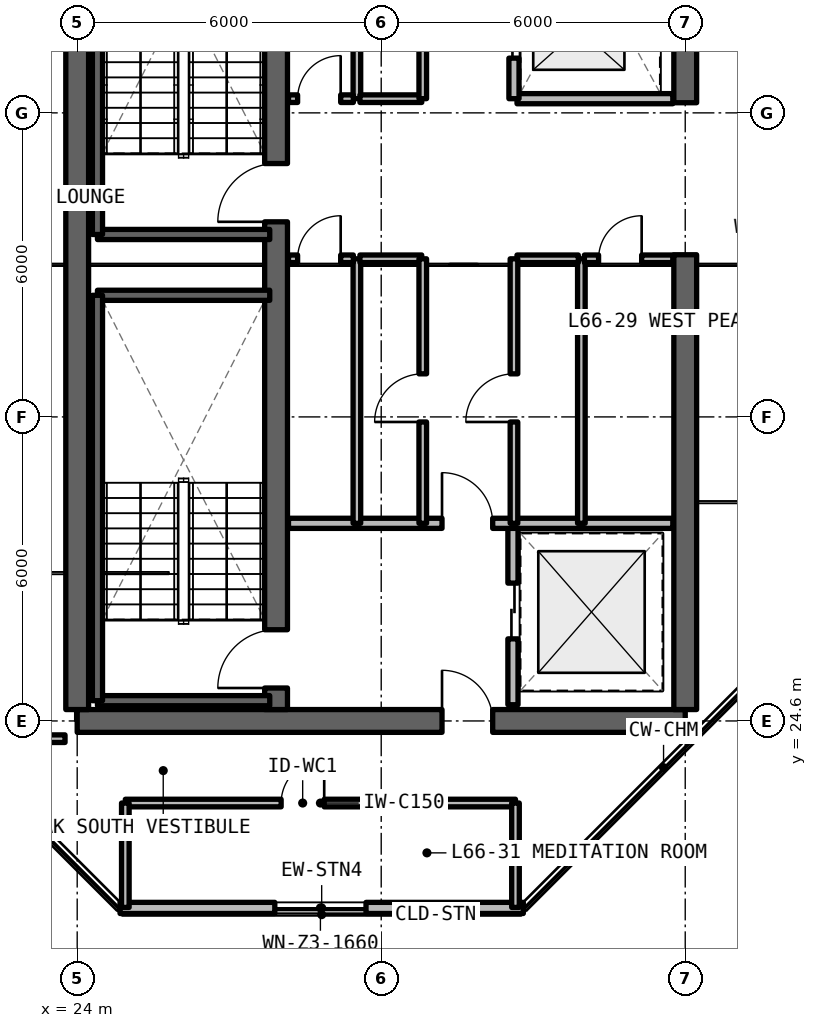
"""IFC4 building model, lengths in metres.
Left out: names, types, materials, properties, quantities, classifications, styles, units other than length and angle.
Written with IfcOpenShell. Run it as: python <this file> out.ifc"""

import sys

from ifc_helpers import new_model, si_unit, direction, frame, frame_2d, origin, place, context, subcontext, project, spatial, rectangle, extrude, element, fill, save


model = new_model("IFC4")
c1 = context("Model", 3, precision=1e-05, world=origin(), true_north=direction((0.0, 1.0)))
c2 = subcontext(c1, "Body", "Model", "MODEL_VIEW")
j1 = project(units=[si_unit("LENGTHUNIT", "METRE"), si_unit("PLANEANGLEUNIT", "RADIAN")], contexts=[c1])
p1 = place(None, origin())
s1 = spatial("IfcSite", under=j1, at=p1, CompositionType="ELEMENT")
p2 = place(p1, origin())
s2 = spatial("IfcBuilding", under=s1, at=p2, CompositionType="ELEMENT")
p3 = place(p2, frame((0.0, 0.0, 235.95)))
s3 = spatial("IfcBuildingStorey", under=s2, at=p3, CompositionType="ELEMENT", Elevation=235.95)
p4 = place(p3, frame((24.0, 24.6, 0.0), z_axis=(0.0, 0.0, 1.0), x_axis=(1.0, 0.0, 0.0)))
e1 = element("IfcWall", 1, at=p4, inside=s3, PredefinedType="SHEAR", context=c2, shape_type="SweptSolid", body=[
    extrude(rectangle(XDim=12.0, YDim=0.45, at=frame_2d((6.0, 0.0))), origin(), (0.0, 0.0, 1.0), 3.3),
])
p5 = place(p4, frame((7.2, 0.0, 0.0)))
e2 = element("IfcOpeningElement", 2, at=p5, cuts=e1, PredefinedType="OPENING", context=c2, shape_type="SweptSolid", body=[
    extrude(rectangle(XDim=1.0, YDim=2.15, at=frame_2d((0.5, 1.075))), frame((0.0, 0.235, 0.0), z_axis=(0.0, -1.0, 0.0), x_axis=(1.0, 0.0, 0.0)), (0.0, 0.0, 1.0), 0.47),
])
p6 = place(p3, frame((24.0, 24.825, 0.0), z_axis=(0.0, 0.0, 1.0), x_axis=(0.0, 1.0, 0.0)))
e3 = element("IfcWall", 3, at=p6, inside=s3, PredefinedType="SHEAR", context=c2, shape_type="SweptSolid", body=[
    extrude(rectangle(XDim=17.55, YDim=0.45, at=frame_2d((8.775, 0.0))), origin(), (0.0, 0.0, 1.0), 3.3),
])
p7 = place(p3, frame((36.0, 24.825, 0.0), z_axis=(0.0, 0.0, 1.0), x_axis=(0.0, 1.0, 0.0)))
e4 = element("IfcWall", 4, at=p7, inside=s3, PredefinedType="SHEAR", context=c2, shape_type="SweptSolid", body=[
    extrude(rectangle(XDim=8.975, YDim=0.45, at=frame_2d((4.488, 0.0))), origin(), (0.0, 0.0, 1.0), 3.3),
])
p8 = place(p3, frame((36.0, 36.8, 0.0), z_axis=(0.0, 0.0, 1.0), x_axis=(0.0, 1.0, 0.0)))
e5 = element("IfcWall", 5, at=p8, inside=s3, PredefinedType="SHEAR", context=c2, shape_type="SweptSolid", body=[
    extrude(rectangle(XDim=5.575, YDim=0.45, at=frame_2d((2.788, 0.0))), origin(), (0.0, 0.0, 1.0), 3.3),
])
p9 = place(p3, frame((27.925, 24.825, 0.0), z_axis=(0.0, 0.0, 1.0), x_axis=(0.0, 1.0, 0.0)))
e6 = element("IfcWall", 6, at=p9, inside=s3, PredefinedType="SHEAR", context=c2, shape_type="SweptSolid", body=[
    extrude(rectangle(XDim=17.55, YDim=0.45, at=frame_2d((8.775, 0.0))), origin(), (0.0, 0.0, 1.0), 3.3),
])
p10 = place(p9, frame((0.425, 0.0, 0.0)))
e7 = element("IfcOpeningElement", 7, at=p10, cuts=e6, PredefinedType="OPENING", context=c2, shape_type="SweptSolid", body=[
    extrude(rectangle(XDim=1.15, YDim=2.15, at=frame_2d((0.575, 1.075))), frame((0.0, 0.235, 0.0), z_axis=(0.0, -1.0, 0.0), x_axis=(1.0, 0.0, 0.0)), (0.0, 0.0, 1.0), 0.47),
])
p11 = place(p9, frame((9.625, 0.0, 0.0)))
e8 = element("IfcOpeningElement", 8, at=p11, cuts=e6, PredefinedType="OPENING", context=c2, shape_type="SweptSolid", body=[
    extrude(rectangle(XDim=1.15, YDim=2.15, at=frame_2d((0.575, 1.075))), frame((0.0, 0.235, 0.0), z_axis=(0.0, -1.0, 0.0), x_axis=(1.0, 0.0, 0.0)), (0.0, 0.0, 1.0), 0.47),
])
p12 = place(p3, frame((24.846, 20.91, 0.0), z_axis=(0.0, 0.0, 1.0), x_axis=(1.0, 0.0, 0.0)))
e9 = element("IfcWall", 9, at=p12, inside=s3, PredefinedType="SOLIDWALL", context=c2, shape_type="SweptSolid", body=[
    extrude(rectangle(XDim=7.959, YDim=0.22, at=frame_2d((3.979, 0.0))), origin(), (0.0, 0.0, 1.0), 3.08),
])
p13 = place(p12, frame((3.054, 0.0, 0.78)))
e10 = element("IfcOpeningElement", 10, at=p13, cuts=e9, PredefinedType="OPENING", context=c2, shape_type="SweptSolid", body=[
    extrude(rectangle(XDim=1.8, YDim=1.66, at=frame_2d((0.9, 0.83))), frame((0.0, 0.12, 0.0), z_axis=(0.0, -1.0, 0.0), x_axis=(1.0, 0.0, 0.0)), (0.0, 0.0, 1.0), 0.24),
])
p14 = place(p3, frame((32.6, 24.92, 0.0), z_axis=(0.0, 0.0, 1.0), x_axis=(0.0, 1.0, 0.0)))
e11 = element("IfcWall", 11, at=p14, inside=s3, PredefinedType="SOLIDWALL", context=c2, shape_type="SweptSolid", body=[
    extrude(rectangle(XDim=3.58, YDim=0.2, at=frame_2d((1.79, 0.0))), origin(), (0.0, 0.0, 1.0), 2.35),
])
p15 = place(p14, frame((1.3, 0.0, 0.0)))
e12 = element("IfcOpeningElement", 12, at=p15, cuts=e11, PredefinedType="OPENING", context=c2, shape_type="SweptSolid", body=[
    extrude(rectangle(XDim=1.1, YDim=2.2, at=frame_2d((0.55, 1.1))), frame((0.0, 0.11, 0.0), z_axis=(0.0, -1.0, 0.0), x_axis=(1.0, 0.0, 0.0)), (0.0, 0.0, 1.0), 0.22),
])
p16 = place(p3, frame((28.17, 28.5, 0.0), z_axis=(0.0, 0.0, 1.0), x_axis=(1.0, 0.0, 0.0)))
e13 = element("IfcWall", 13, at=p16, inside=s3, PredefinedType="SOLIDWALL", context=c2, shape_type="SweptSolid", body=[
    extrude(rectangle(XDim=7.585, YDim=0.2, at=frame_2d((3.792, 0.0))), origin(), (0.0, 0.0, 1.0), 2.35),
])
p17 = place(p16, frame((3.03, 0.0, 0.0)))
e14 = element("IfcOpeningElement", 14, at=p17, cuts=e13, PredefinedType="OPENING", context=c2, shape_type="SweptSolid", body=[
    extrude(rectangle(XDim=1.0, YDim=2.15, at=frame_2d((0.5, 1.075))), frame((0.0, 0.11, 0.0), z_axis=(0.0, -1.0, 0.0), x_axis=(1.0, 0.0, 0.0)), (0.0, 0.0, 1.0), 0.22),
])
p18 = place(p3, frame((29.52, 28.5, 0.0), z_axis=(0.0, 0.0, 1.0), x_axis=(0.0, 1.0, 0.0)))
e15 = element("IfcWall", 15, at=p18, inside=s3, PredefinedType="SOLIDWALL", context=c2, shape_type="SweptSolid", body=[
    extrude(rectangle(XDim=5.22, YDim=0.15, at=frame_2d((2.61, 0.0))), origin(), (0.0, 0.0, 1.0), 2.35),
])
p19 = place(p3, frame((28.17, 33.72, 0.0), z_axis=(0.0, 0.0, 1.0), x_axis=(1.0, 0.0, 0.0)))
e16 = element("IfcWall", 16, at=p19, inside=s3, PredefinedType="SOLIDWALL", context=c2, shape_type="SweptSolid", body=[
    extrude(rectangle(XDim=1.28, YDim=0.15, at=frame_2d((0.64, 0.0))), origin(), (0.0, 0.0, 1.0), 2.35),
])
p20 = place(p19, frame((0.18, 0.0, 0.0)))
e17 = element("IfcOpeningElement", 17, at=p20, cuts=e16, PredefinedType="OPENING", context=c2, shape_type="SweptSolid", body=[
    extrude(rectangle(XDim=0.85, YDim=2.1, at=frame_2d((0.425, 1.05))), frame((0.0, 0.085, 0.0), z_axis=(0.0, -1.0, 0.0), x_axis=(1.0, 0.0, 0.0)), (0.0, 0.0, 1.0), 0.17),
])
p21 = place(p3, frame((29.58, 33.72, 0.0), z_axis=(0.0, 0.0, 1.0), x_axis=(1.0, 0.0, 0.0)))
e18 = element("IfcWall", 18, at=p21, inside=s3, PredefinedType="SOLIDWALL", context=c2, shape_type="SweptSolid", body=[
    extrude(rectangle(XDim=1.22, YDim=0.15, at=frame_2d((0.61, 0.0))), origin(), (0.0, 0.0, 1.0), 2.35),
])
p22 = place(p3, frame((30.82, 28.5, 0.0), z_axis=(0.0, 0.0, 1.0), x_axis=(0.0, 1.0, 0.0)))
e19 = element("IfcWall", 19, at=p22, inside=s3, PredefinedType="SOLIDWALL", context=c2, shape_type="SweptSolid", body=[
    extrude(rectangle(XDim=5.22, YDim=0.15, at=frame_2d((2.61, 0.0))), origin(), (0.0, 0.0, 1.0), 2.35),
])
p23 = place(p22, frame((2.0, 0.0, 0.0)))
e20 = element("IfcOpeningElement", 20, at=p23, cuts=e19, PredefinedType="OPENING", context=c2, shape_type="SweptSolid", body=[
    extrude(rectangle(XDim=0.95, YDim=2.15, at=frame_2d((0.475, 1.075))), frame((0.0, 0.085, 0.0), z_axis=(0.0, -1.0, 0.0), x_axis=(1.0, 0.0, 0.0)), (0.0, 0.0, 1.0), 0.17),
])
p24 = place(p3, frame((33.95, 28.5, 0.0), z_axis=(0.0, 0.0, 1.0), x_axis=(0.0, 1.0, 0.0)))
e21 = element("IfcWall", 21, at=p24, inside=s3, PredefinedType="SOLIDWALL", context=c2, shape_type="SweptSolid", body=[
    extrude(rectangle(XDim=5.22, YDim=0.15, at=frame_2d((2.61, 0.0))), origin(), (0.0, 0.0, 1.0), 2.35),
])
p25 = place(p3, frame((32.68, 33.72, 0.0), z_axis=(0.0, 0.0, 1.0), x_axis=(1.0, 0.0, 0.0)))
e22 = element("IfcWall", 22, at=p25, inside=s3, PredefinedType="SOLIDWALL", context=c2, shape_type="SweptSolid", body=[
    extrude(rectangle(XDim=1.21, YDim=0.15, at=frame_2d((0.605, 0.0))), origin(), (0.0, 0.0, 1.0), 2.35),
])
p26 = place(p3, frame((34.01, 33.72, 0.0), z_axis=(0.0, 0.0, 1.0), x_axis=(1.0, 0.0, 0.0)))
e23 = element("IfcWall", 23, at=p26, inside=s3, PredefinedType="SOLIDWALL", context=c2, shape_type="SweptSolid", body=[
    extrude(rectangle(XDim=1.745, YDim=0.15, at=frame_2d((0.873, 0.0))), origin(), (0.0, 0.0, 1.0), 2.35),
])
p27 = place(p26, frame((0.28, 0.0, 0.0)))
e24 = element("IfcOpeningElement", 24, at=p27, cuts=e23, PredefinedType="OPENING", context=c2, shape_type="SweptSolid", body=[
    extrude(rectangle(XDim=0.85, YDim=2.1, at=frame_2d((0.425, 1.05))), frame((0.0, 0.085, 0.0), z_axis=(0.0, -1.0, 0.0), x_axis=(1.0, 0.0, 0.0)), (0.0, 0.0, 1.0), 0.17),
])
p28 = place(p3, frame((32.62, 28.5, 0.0), z_axis=(0.0, 0.0, 1.0), x_axis=(0.0, 1.0, 0.0)))
e25 = element("IfcWall", 25, at=p28, inside=s3, PredefinedType="SOLIDWALL", context=c2, shape_type="SweptSolid", body=[
    extrude(rectangle(XDim=5.22, YDim=0.15, at=frame_2d((2.61, 0.0))), origin(), (0.0, 0.0, 1.0), 2.35),
])
p29 = place(p28, frame((2.0, 0.0, 0.0)))
e26 = element("IfcOpeningElement", 26, at=p29, cuts=e25, PredefinedType="OPENING", context=c2, shape_type="SweptSolid", body=[
    extrude(rectangle(XDim=0.95, YDim=2.15, at=frame_2d((0.475, 1.075))), frame((0.0, 0.085, 0.0), z_axis=(0.0, -1.0, 0.0), x_axis=(1.0, 0.0, 0.0)), (0.0, 0.0, 1.0), 0.17),
])
p30 = place(p3, frame((29.52, 36.88, 0.0), z_axis=(0.0, 0.0, 1.0), x_axis=(0.0, 1.0, 0.0)))
e27 = element("IfcWall", 27, at=p30, inside=s3, PredefinedType="SOLIDWALL", context=c2, shape_type="SweptSolid", body=[
    extrude(rectangle(XDim=5.42, YDim=0.15, at=frame_2d((2.71, 0.0))), origin(), (0.0, 0.0, 1.0), 2.35),
])
p31 = place(p3, frame((28.17, 36.88, 0.0), z_axis=(0.0, 0.0, 1.0), x_axis=(1.0, 0.0, 0.0)))
e28 = element("IfcWall", 28, at=p31, inside=s3, PredefinedType="SOLIDWALL", context=c2, shape_type="SweptSolid", body=[
    extrude(rectangle(XDim=1.28, YDim=0.15, at=frame_2d((0.64, 0.0))), origin(), (0.0, 0.0, 1.0), 2.35),
])
p32 = place(p31, frame((0.18, 0.0, 0.0)))
e29 = element("IfcOpeningElement", 29, at=p32, cuts=e28, PredefinedType="OPENING", context=c2, shape_type="SweptSolid", body=[
    extrude(rectangle(XDim=0.85, YDim=2.1, at=frame_2d((0.425, 1.05))), frame((0.0, 0.085, 0.0), z_axis=(0.0, -1.0, 0.0), x_axis=(1.0, 0.0, 0.0)), (0.0, 0.0, 1.0), 0.17),
])
p33 = place(p3, frame((29.58, 36.88, 0.0), z_axis=(0.0, 0.0, 1.0), x_axis=(1.0, 0.0, 0.0)))
e30 = element("IfcWall", 30, at=p33, inside=s3, PredefinedType="SOLIDWALL", context=c2, shape_type="SweptSolid", body=[
    extrude(rectangle(XDim=1.22, YDim=0.15, at=frame_2d((0.61, 0.0))), origin(), (0.0, 0.0, 1.0), 2.35),
])
p34 = place(p3, frame((30.82, 36.88, 0.0), z_axis=(0.0, 0.0, 1.0), x_axis=(0.0, 1.0, 0.0)))
e31 = element("IfcWall", 31, at=p34, inside=s3, PredefinedType="SOLIDWALL", context=c2, shape_type="SweptSolid", body=[
    extrude(rectangle(XDim=5.42, YDim=0.15, at=frame_2d((2.71, 0.0))), origin(), (0.0, 0.0, 1.0), 2.35),
])
p35 = place(p34, frame((2.1, 0.0, 0.0)))
e32 = element("IfcOpeningElement", 32, at=p35, cuts=e31, PredefinedType="OPENING", context=c2, shape_type="SweptSolid", body=[
    extrude(rectangle(XDim=0.95, YDim=2.15, at=frame_2d((0.475, 1.075))), frame((0.0, 0.085, 0.0), z_axis=(0.0, -1.0, 0.0), x_axis=(1.0, 0.0, 0.0)), (0.0, 0.0, 1.0), 0.17),
])
p36 = place(p3, frame((32.68, 36.88, 0.0), z_axis=(0.0, 0.0, 1.0), x_axis=(1.0, 0.0, 0.0)))
e33 = element("IfcWall", 33, at=p36, inside=s3, PredefinedType="SOLIDWALL", context=c2, shape_type="SweptSolid", body=[
    extrude(rectangle(XDim=3.075, YDim=0.2, at=frame_2d((1.538, 0.0))), origin(), (0.0, 0.0, 1.0), 2.35),
])
p37 = place(p3, frame((32.62, 36.88, 0.0), z_axis=(0.0, 0.0, 1.0), x_axis=(0.0, 1.0, 0.0)))
e34 = element("IfcWall", 34, at=p37, inside=s3, PredefinedType="SOLIDWALL", context=c2, shape_type="SweptSolid", body=[
    extrude(rectangle(XDim=5.42, YDim=0.2, at=frame_2d((2.71, 0.0))), origin(), (0.0, 0.0, 1.0), 2.35),
])
p38 = place(p37, frame((0.8, 0.0, 0.0)))
e35 = element("IfcOpeningElement", 35, at=p38, cuts=e34, PredefinedType="OPENING", context=c2, shape_type="SweptSolid", body=[
    extrude(rectangle(XDim=1.1, YDim=2.2, at=frame_2d((0.55, 1.1))), frame((0.0, 0.11, 0.0), z_axis=(0.0, -1.0, 0.0), x_axis=(1.0, 0.0, 0.0)), (0.0, 0.0, 1.0), 0.22),
])
p39 = place(p37, frame((3.3, 0.0, 0.0)))
e36 = element("IfcOpeningElement", 36, at=p39, cuts=e34, PredefinedType="OPENING", context=c2, shape_type="SweptSolid", body=[
    extrude(rectangle(XDim=1.1, YDim=2.2, at=frame_2d((0.55, 1.1))), frame((0.0, 0.11, 0.0), z_axis=(0.0, -1.0, 0.0), x_axis=(1.0, 0.0, 0.0)), (0.0, 0.0, 1.0), 0.22),
])
p40 = place(p3, frame((24.95, 22.98, 0.0), z_axis=(0.0, 0.0, 1.0), x_axis=(1.0, 0.0, 0.0)))
e37 = element("IfcWall", 37, at=p40, inside=s3, PredefinedType="SOLIDWALL", context=c2, shape_type="SweptSolid", body=[
    extrude(rectangle(XDim=7.7, YDim=0.15, at=frame_2d((3.85, 0.0))), origin(), (0.0, 0.0, 1.0), 2.35),
])
p41 = place(p40, frame((3.075, 0.0, 0.0)))
e38 = element("IfcOpeningElement", 38, at=p41, cuts=e37, PredefinedType="OPENING", context=c2, shape_type="SweptSolid", body=[
    extrude(rectangle(XDim=0.85, YDim=2.1, at=frame_2d((0.425, 1.05))), frame((0.0, 0.085, 0.0), z_axis=(0.0, -1.0, 0.0), x_axis=(1.0, 0.0, 0.0)), (0.0, 0.0, 1.0), 0.17),
])
for number, where, z_axis, x_axis in (
    (39, (24.95, 20.92, 0.0), (0.0, 0.0, 1.0), (0.0, 1.0, 0.0)),
    (40, (32.65, 20.92, 0.0), (0.0, 0.0, 1.0), (0.0, 1.0, 0.0)),
):
    element("IfcWall", number, at=place(p3, frame(where, z_axis=z_axis, x_axis=x_axis)), inside=s3, PredefinedType="SOLIDWALL", context=c2, shape_type="SweptSolid", body=[
        extrude(rectangle(XDim=2.06, YDim=0.15, at=frame_2d((1.03, 0.0))), origin(), (0.0, 0.0, 1.0), 2.35),
    ])
p42 = place(p3, frame((22.12, 24.25, 0.0), z_axis=(0.0, 0.0, 1.0), x_axis=(1.0, 0.0, 0.0)))
e41 = element("IfcWall", 41, at=p42, inside=s3, PredefinedType="SOLIDWALL", context=c2, shape_type="SweptSolid", body=[
    extrude(rectangle(XDim=1.64, YDim=0.15, at=frame_2d((0.82, 0.0))), origin(), (0.0, 0.0, 1.0), 2.35),
])
p43 = place(p42, frame((0.325, 0.0, 0.0)))
e42 = element("IfcOpeningElement", 42, at=p43, cuts=e41, PredefinedType="OPENING", context=c2, shape_type="SweptSolid", body=[
    extrude(rectangle(XDim=0.85, YDim=2.1, at=frame_2d((0.425, 1.05))), frame((0.0, 0.085, 0.0), z_axis=(0.0, -1.0, 0.0), x_axis=(1.0, 0.0, 0.0)), (0.0, 0.0, 1.0), 0.17),
])
for number, where, z_axis, x_axis in (
    (43, (24.4, 25.0, 0.0), (0.0, 0.0, 1.0), (1.0, 0.0, 0.0)),
    (44, (27.8, 33.0, 0.0), (0.0, 0.0, 1.0), (-1.0, 0.0, 0.0)),
):
    element("IfcWall", number, at=place(p3, frame(where, z_axis=z_axis, x_axis=x_axis)), inside=s3, PredefinedType="SOLIDWALL", context=c2, shape_type="SweptSolid", body=[
        extrude(rectangle(XDim=3.4, YDim=0.2, at=frame_2d((1.7, 0.0))), origin(), (0.0, 0.0, 1.0), 3.3),
    ])
p44 = place(p3, frame((24.4, 33.0, 0.0), z_axis=(0.0, 0.0, 1.0), x_axis=(0.0, -1.0, 0.0)))
e45 = element("IfcWall", 45, at=p44, inside=s3, PredefinedType="SOLIDWALL", context=c2, shape_type="SweptSolid", body=[
    extrude(rectangle(XDim=8.0, YDim=0.2, at=frame_2d((4.0, 0.0))), origin(), (0.0, 0.0, 1.0), 3.3),
])
p45 = place(p3, frame((24.4, 34.2, 0.0), z_axis=(0.0, 0.0, 1.0), x_axis=(1.0, 0.0, 0.0)))
e46 = element("IfcWall", 46, at=p45, inside=s3, PredefinedType="SOLIDWALL", context=c2, shape_type="SweptSolid", body=[
    extrude(rectangle(XDim=3.4, YDim=0.2, at=frame_2d((1.7, 0.0))), origin(), (0.0, 0.0, 1.0), 3.3),
])
p46 = place(p3, frame((24.4, 42.2, 0.0), z_axis=(0.0, 0.0, 1.0), x_axis=(0.0, -1.0, 0.0)))
e47 = element("IfcWall", 47, at=p46, inside=s3, PredefinedType="SOLIDWALL", context=c2, shape_type="SweptSolid", body=[
    extrude(rectangle(XDim=8.0, YDim=0.2, at=frame_2d((4.0, 0.0))), origin(), (0.0, 0.0, 1.0), 3.3),
])
p47 = place(p13, origin())
e48 = element("IfcWindow", 48, at=p47, inside=s3, PartitioningType="SINGLE_PANEL", PredefinedType="WINDOW", context=c2, shape_type="SweptSolid", body=[
    extrude(rectangle(XDim=1.8, YDim=1.66, at=frame_2d((0.9, 0.83))), frame((0.0, 0.03, 0.0), z_axis=(0.0, -1.0, 0.0), x_axis=(1.0, 0.0, 0.0)), (0.0, 0.0, 1.0), 0.06),
])
fill(e10, e48)
p48 = place(p15, origin())
e49 = element("IfcDoor", 49, at=p48, inside=s3, OperationType="SLIDING_TO_LEFT", PredefinedType="DOOR", context=c2, shape_type="SweptSolid", body=[
    extrude(rectangle(XDim=1.1, YDim=2.2, at=frame_2d((0.55, 1.1))), frame((0.0, 0.025, 0.0), z_axis=(0.0, -1.0, 0.0), x_axis=(1.0, 0.0, 0.0)), (0.0, 0.0, 1.0), 0.05),
])
fill(e12, e49)
p49 = place(p17, origin())
e50 = element("IfcDoor", 50, at=p49, inside=s3, OperationType="SINGLE_SWING_LEFT", PredefinedType="DOOR", context=c2, shape_type="SweptSolid", body=[
    extrude(rectangle(XDim=1.0, YDim=2.15, at=frame_2d((0.5, 1.075))), frame((0.0, 0.025, 0.0), z_axis=(0.0, -1.0, 0.0), x_axis=(1.0, 0.0, 0.0)), (0.0, 0.0, 1.0), 0.05),
])
fill(e14, e50)
p50 = place(p20, origin())
e51 = element("IfcDoor", 51, at=p50, inside=s3, OperationType="SINGLE_SWING_RIGHT", PredefinedType="DOOR", context=c2, shape_type="SweptSolid", body=[
    extrude(rectangle(XDim=0.85, YDim=2.1, at=frame_2d((0.425, 1.05))), frame((0.0, 0.025, 0.0), z_axis=(0.0, -1.0, 0.0), x_axis=(1.0, 0.0, 0.0)), (0.0, 0.0, 1.0), 0.05),
])
fill(e17, e51)
p51 = place(p23, origin())
e52 = element("IfcDoor", 52, at=p51, inside=s3, OperationType="SINGLE_SWING_LEFT", PredefinedType="DOOR", context=c2, shape_type="SweptSolid", body=[
    extrude(rectangle(XDim=0.95, YDim=2.15, at=frame_2d((0.475, 1.075))), frame((0.0, 0.025, 0.0), z_axis=(0.0, -1.0, 0.0), x_axis=(1.0, 0.0, 0.0)), (0.0, 0.0, 1.0), 0.05),
])
fill(e20, e52)
p52 = place(p27, origin())
e53 = element("IfcDoor", 53, at=p52, inside=s3, OperationType="SINGLE_SWING_RIGHT", PredefinedType="DOOR", context=c2, shape_type="SweptSolid", body=[
    extrude(rectangle(XDim=0.85, YDim=2.1, at=frame_2d((0.425, 1.05))), frame((0.0, 0.025, 0.0), z_axis=(0.0, -1.0, 0.0), x_axis=(1.0, 0.0, 0.0)), (0.0, 0.0, 1.0), 0.05),
])
fill(e24, e53)
p53 = place(p29, origin())
e54 = element("IfcDoor", 54, at=p53, inside=s3, OperationType="SINGLE_SWING_LEFT", PredefinedType="DOOR", context=c2, shape_type="SweptSolid", body=[
    extrude(rectangle(XDim=0.95, YDim=2.15, at=frame_2d((0.475, 1.075))), frame((0.0, 0.025, 0.0), z_axis=(0.0, -1.0, 0.0), x_axis=(1.0, 0.0, 0.0)), (0.0, 0.0, 1.0), 0.05),
])
fill(e26, e54)
p54 = place(p32, origin())
e55 = element("IfcDoor", 55, at=p54, inside=s3, OperationType="SINGLE_SWING_RIGHT", PredefinedType="DOOR", context=c2, shape_type="SweptSolid", body=[
    extrude(rectangle(XDim=0.85, YDim=2.1, at=frame_2d((0.425, 1.05))), frame((0.0, 0.025, 0.0), z_axis=(0.0, -1.0, 0.0), x_axis=(1.0, 0.0, 0.0)), (0.0, 0.0, 1.0), 0.05),
])
fill(e29, e55)
p55 = place(p38, origin())
e56 = element("IfcDoor", 56, at=p55, inside=s3, OperationType="SLIDING_TO_LEFT", PredefinedType="DOOR", context=c2, shape_type="SweptSolid", body=[
    extrude(rectangle(XDim=1.1, YDim=2.2, at=frame_2d((0.55, 1.1))), frame((0.0, 0.025, 0.0), z_axis=(0.0, -1.0, 0.0), x_axis=(1.0, 0.0, 0.0)), (0.0, 0.0, 1.0), 0.05),
])
fill(e35, e56)
p56 = place(p41, origin())
e57 = element("IfcDoor", 57, at=p56, inside=s3, OperationType="SINGLE_SWING_RIGHT", PredefinedType="DOOR", context=c2, shape_type="SweptSolid", body=[
    extrude(rectangle(XDim=0.85, YDim=2.1, at=frame_2d((0.425, 1.05))), frame((0.0, 0.025, 0.0), z_axis=(0.0, -1.0, 0.0), x_axis=(1.0, 0.0, 0.0)), (0.0, 0.0, 1.0), 0.05),
])
fill(e38, e57)
p57 = place(p10, origin())
e58 = element("IfcDoor", 58, at=p57, inside=s3, OperationType="SINGLE_SWING_LEFT", PredefinedType="DOOR", context=c2, shape_type="SweptSolid", body=[
    extrude(rectangle(XDim=1.15, YDim=2.15, at=frame_2d((0.575, 1.075))), frame((0.0, 0.025, 0.0), z_axis=(0.0, -1.0, 0.0), x_axis=(1.0, 0.0, 0.0)), (0.0, 0.0, 1.0), 0.05),
])
fill(e7, e58)
p58 = place(p11, origin())
e59 = element("IfcDoor", 59, at=p58, inside=s3, OperationType="SINGLE_SWING_RIGHT", PredefinedType="DOOR", context=c2, shape_type="SweptSolid", body=[
    extrude(rectangle(XDim=1.15, YDim=2.15, at=frame_2d((0.575, 1.075))), frame((0.0, 0.025, 0.0), z_axis=(0.0, -1.0, 0.0), x_axis=(1.0, 0.0, 0.0)), (0.0, 0.0, 1.0), 0.05),
])
fill(e8, e59)
p59 = place(p5, origin())
e60 = element("IfcDoor", 60, at=p59, inside=s3, OperationType="SINGLE_SWING_LEFT", PredefinedType="DOOR", context=c2, shape_type="SweptSolid", body=[
    extrude(rectangle(XDim=1.0, YDim=2.15, at=frame_2d((0.5, 1.075))), frame((0.0, 0.025, 0.0), z_axis=(0.0, -1.0, 0.0), x_axis=(1.0, 0.0, 0.0)), (0.0, 0.0, 1.0), 0.05),
])
fill(e2, e60)
save(model, sys.argv[1])
